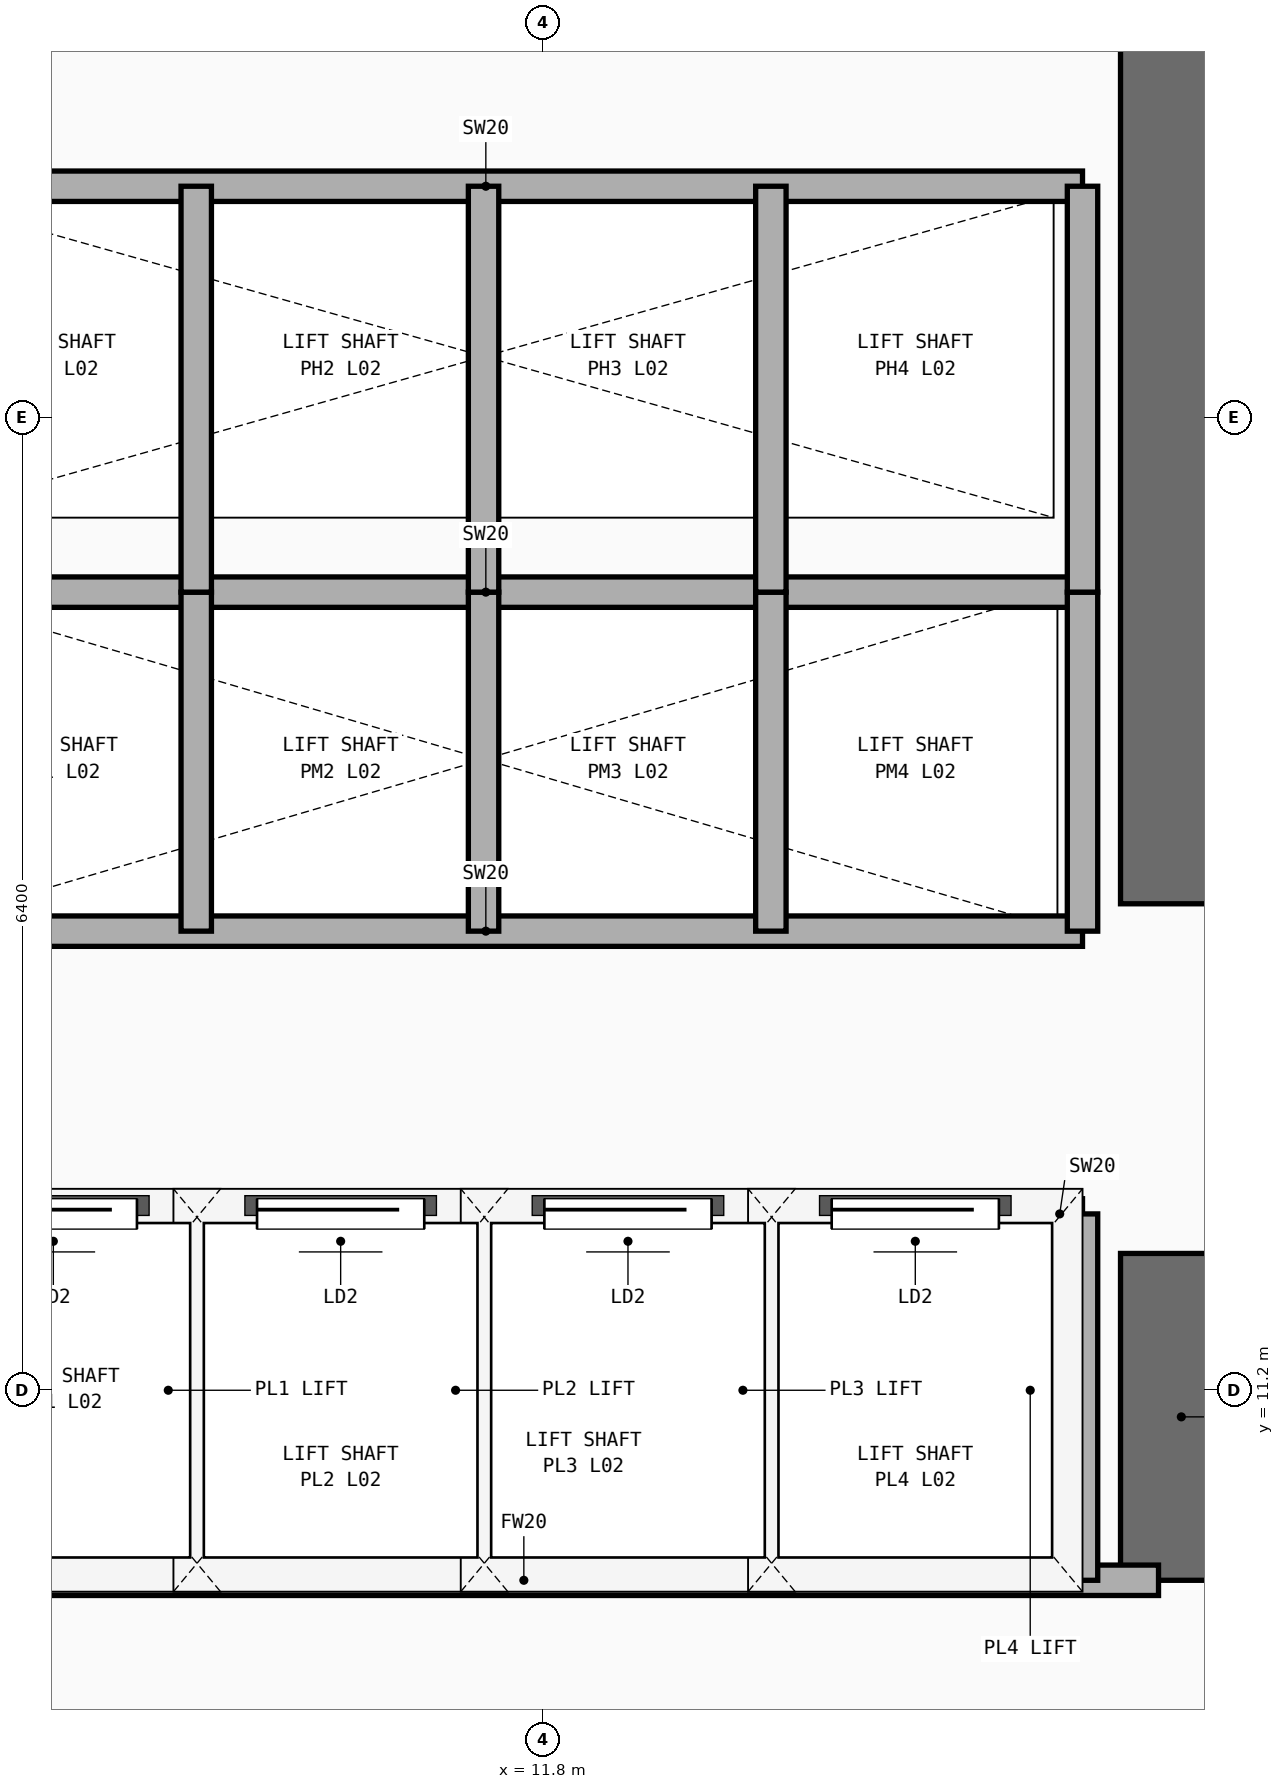
"""IFC4 building model, lengths in metres.
Left out: names, types, materials, properties, quantities, classifications, styles, units other than length and angle.
Written with IfcOpenShell. Run it as: python <this file> out.ifc"""

import sys

from ifc_helpers import new_model, si_unit, direction, frame, frame_2d, origin, place, context, subcontext, project, spatial, rectangle, extrude, element, fill, save


model = new_model("IFC4")
c1 = context("Model", 3, precision=1e-05, world=origin(), true_north=direction((0.0, 1.0)))
c2 = subcontext(c1, "Body", "Model", "MODEL_VIEW")
j1 = project(units=[si_unit("LENGTHUNIT", "METRE"), si_unit("PLANEANGLEUNIT", "RADIAN")], contexts=[c1])
p1 = place(None, origin())
s1 = spatial("IfcSite", under=j1, at=p1, CompositionType="ELEMENT")
p2 = place(p1, origin())
s2 = spatial("IfcBuilding", under=s1, at=p2, CompositionType="ELEMENT")
p3 = place(p2, frame((0.0, 0.0, 5.6)))
s3 = spatial("IfcBuildingStorey", under=s2, at=p3, CompositionType="ELEMENT", Elevation=5.6)
p4 = place(p3, frame((16.0, 9.95, 0.0), z_axis=(0.0, 0.0, 1.0), x_axis=(0.0, 1.0, 0.0)))
e1 = element("IfcWall", 1, at=p4, inside=s3, PredefinedType="SHEAR", context=c2, shape_type="SweptSolid", body=[
    extrude(rectangle(XDim=2.15, YDim=0.8, at=frame_2d((1.075, 0.0))), origin(), (0.0, 0.0, 1.0), 4.46),
])
p5 = place(p3, frame((16.0, 14.4, 0.0), z_axis=(0.0, 0.0, 1.0), x_axis=(0.0, 1.0, 0.0)))
e2 = element("IfcWall", 2, at=p5, inside=s3, PredefinedType="SHEAR", context=c2, shape_type="SweptSolid", body=[
    extrude(rectangle(XDim=9.1, YDim=0.8, at=frame_2d((4.55, 0.0))), origin(), (0.0, 0.0, 1.0), 4.46),
])
p6 = place(p3, frame((7.5, 9.95, 0.0), z_axis=(0.0, 0.0, 1.0), x_axis=(1.0, 0.0, 0.0)))
e3 = element("IfcWall", 3, at=p6, inside=s3, PredefinedType="PARTITIONING", context=c2, shape_type="SweptSolid", body=[
    extrude(rectangle(XDim=8.35, YDim=0.2, at=frame_2d((4.175, 0.0))), origin(), (0.0, 0.0, 1.0), 4.46),
])
p7 = place(p3, frame((7.5, 12.36, 0.0), z_axis=(0.0, 0.0, 1.0), x_axis=(1.0, 0.0, 0.0)))
e4 = element("IfcWall", 4, at=p7, inside=s3, PredefinedType="PARTITIONING", context=c2, shape_type="SweptSolid", body=[
    extrude(rectangle(XDim=7.85, YDim=0.2, at=frame_2d((3.925, 0.0))), origin(), (0.0, 0.0, 1.0), 4.46),
])
p8 = place(p7, frame((0.53, 0.0, 0.0)))
e5 = element("IfcOpeningElement", 5, at=p8, cuts=e4, PredefinedType="OPENING", context=c2, shape_type="SweptSolid", body=[
    extrude(rectangle(XDim=1.1, YDim=2.2, at=frame_2d((0.55, 1.1))), frame((0.0, 0.11, 0.0), z_axis=(0.0, -1.0, 0.0), x_axis=(1.0, 0.0, 0.0)), (0.0, 0.0, 1.0), 0.22),
])
p9 = place(p7, frame((2.42, 0.0, 0.0)))
e6 = element("IfcOpeningElement", 6, at=p9, cuts=e4, PredefinedType="OPENING", context=c2, shape_type="SweptSolid", body=[
    extrude(rectangle(XDim=1.1, YDim=2.2, at=frame_2d((0.55, 1.1))), frame((0.0, 0.11, 0.0), z_axis=(0.0, -1.0, 0.0), x_axis=(1.0, 0.0, 0.0)), (0.0, 0.0, 1.0), 0.22),
])
p10 = place(p7, frame((4.31, 0.0, 0.0)))
e7 = element("IfcOpeningElement", 7, at=p10, cuts=e4, PredefinedType="OPENING", context=c2, shape_type="SweptSolid", body=[
    extrude(rectangle(XDim=1.1, YDim=2.2, at=frame_2d((0.55, 1.1))), frame((0.0, 0.11, 0.0), z_axis=(0.0, -1.0, 0.0), x_axis=(1.0, 0.0, 0.0)), (0.0, 0.0, 1.0), 0.22),
])
p11 = place(p7, frame((6.2, 0.0, 0.0)))
e8 = element("IfcOpeningElement", 8, at=p11, cuts=e4, PredefinedType="OPENING", context=c2, shape_type="SweptSolid", body=[
    extrude(rectangle(XDim=1.1, YDim=2.2, at=frame_2d((0.55, 1.1))), frame((0.0, 0.11, 0.0), z_axis=(0.0, -1.0, 0.0), x_axis=(1.0, 0.0, 0.0)), (0.0, 0.0, 1.0), 0.22),
])
for number, where, z_axis, x_axis in (
    (9, (15.35, 9.95, 0.0), (0.0, 0.0, 1.0), (0.0, 1.0, 0.0)),
    (10, (9.52, 9.95, 0.0), (0.0, 0.0, 1.0), (0.0, 1.0, 0.0)),
    (11, (11.41, 9.95, 0.0), (0.0, 0.0, 1.0), (0.0, 1.0, 0.0)),
    (12, (13.3, 9.95, 0.0), (0.0, 0.0, 1.0), (0.0, 1.0, 0.0)),
):
    element("IfcWall", number, at=place(p3, frame(where, z_axis=z_axis, x_axis=x_axis)), inside=s3, PredefinedType="PARTITIONING", context=c2, shape_type="SweptSolid", body=[
        extrude(rectangle(XDim=2.41, YDim=0.2, at=frame_2d((1.205, 0.0))), origin(), (0.0, 0.0, 1.0), 4.46),
    ])
for number, where, z_axis, x_axis in (
    (13, (7.5, 14.22, 0.0), (0.0, 0.0, 1.0), (1.0, 0.0, 0.0)),
    (14, (7.5, 16.45, 0.0), (0.0, 0.0, 1.0), (1.0, 0.0, 0.0)),
):
    element("IfcWall", number, at=place(p3, frame(where, z_axis=z_axis, x_axis=x_axis)), inside=s3, PredefinedType="PARTITIONING", context=c2, shape_type="SweptSolid", body=[
        extrude(rectangle(XDim=7.85, YDim=0.2, at=frame_2d((3.925, 0.0))), origin(), (0.0, 0.0, 1.0), 4.46),
    ])
for number, where, z_axis, x_axis in (
    (15, (15.35, 14.22, 0.0), (0.0, 0.0, 1.0), (0.0, 1.0, 0.0)),
    (16, (9.52, 14.22, 0.0), (0.0, 0.0, 1.0), (0.0, 1.0, 0.0)),
    (17, (11.41, 14.22, 0.0), (0.0, 0.0, 1.0), (0.0, 1.0, 0.0)),
    (18, (13.3, 14.22, 0.0), (0.0, 0.0, 1.0), (0.0, 1.0, 0.0)),
):
    element("IfcWall", number, at=place(p3, frame(where, z_axis=z_axis, x_axis=x_axis)), inside=s3, PredefinedType="PARTITIONING", context=c2, shape_type="SweptSolid", body=[
        extrude(rectangle(XDim=2.23, YDim=0.2, at=frame_2d((1.115, 0.0))), origin(), (0.0, 0.0, 1.0), 4.46),
    ])
p12 = place(p3, frame((7.5, 19.12, 0.0), z_axis=(0.0, 0.0, 1.0), x_axis=(1.0, 0.0, 0.0)))
e19 = element("IfcWall", 19, at=p12, inside=s3, PredefinedType="PARTITIONING", context=c2, shape_type="SweptSolid", body=[
    extrude(rectangle(XDim=7.85, YDim=0.2, at=frame_2d((3.925, 0.0))), origin(), (0.0, 0.0, 1.0), 4.46),
])
for number, where, z_axis, x_axis in (
    (20, (15.35, 16.45, 0.0), (0.0, 0.0, 1.0), (0.0, 1.0, 0.0)),
    (21, (9.52, 16.45, 0.0), (0.0, 0.0, 1.0), (0.0, 1.0, 0.0)),
    (22, (11.41, 16.45, 0.0), (0.0, 0.0, 1.0), (0.0, 1.0, 0.0)),
    (23, (13.3, 16.45, 0.0), (0.0, 0.0, 1.0), (0.0, 1.0, 0.0)),
):
    element("IfcWall", number, at=place(p3, frame(where, z_axis=z_axis, x_axis=x_axis)), inside=s3, PredefinedType="PARTITIONING", context=c2, shape_type="SweptSolid", body=[
        extrude(rectangle(XDim=2.67, YDim=0.2, at=frame_2d((1.335, 0.0))), origin(), (0.0, 0.0, 1.0), 4.46),
    ])
p13 = place(p8, origin())
e24 = element("IfcDoor", 24, at=p13, inside=s3, OperationType="SLIDING_TO_LEFT", PredefinedType="DOOR", context=c2, shape_type="SweptSolid", body=[
    extrude(rectangle(XDim=1.1, YDim=2.2, at=frame_2d((0.55, 1.1))), frame((0.0, 0.025, 0.0), z_axis=(0.0, -1.0, 0.0), x_axis=(1.0, 0.0, 0.0)), (0.0, 0.0, 1.0), 0.05),
])
fill(e5, e24)
p14 = place(p9, origin())
e25 = element("IfcDoor", 25, at=p14, inside=s3, OperationType="SLIDING_TO_LEFT", PredefinedType="DOOR", context=c2, shape_type="SweptSolid", body=[
    extrude(rectangle(XDim=1.1, YDim=2.2, at=frame_2d((0.55, 1.1))), frame((0.0, 0.025, 0.0), z_axis=(0.0, -1.0, 0.0), x_axis=(1.0, 0.0, 0.0)), (0.0, 0.0, 1.0), 0.05),
])
fill(e6, e25)
p15 = place(p10, origin())
e26 = element("IfcDoor", 26, at=p15, inside=s3, OperationType="SLIDING_TO_LEFT", PredefinedType="DOOR", context=c2, shape_type="SweptSolid", body=[
    extrude(rectangle(XDim=1.1, YDim=2.2, at=frame_2d((0.55, 1.1))), frame((0.0, 0.025, 0.0), z_axis=(0.0, -1.0, 0.0), x_axis=(1.0, 0.0, 0.0)), (0.0, 0.0, 1.0), 0.05),
])
fill(e7, e26)
p16 = place(p11, origin())
e27 = element("IfcDoor", 27, at=p16, inside=s3, OperationType="SLIDING_TO_LEFT", PredefinedType="DOOR", context=c2, shape_type="SweptSolid", body=[
    extrude(rectangle(XDim=1.1, YDim=2.2, at=frame_2d((0.55, 1.1))), frame((0.0, 0.025, 0.0), z_axis=(0.0, -1.0, 0.0), x_axis=(1.0, 0.0, 0.0)), (0.0, 0.0, 1.0), 0.05),
])
fill(e8, e27)
save(model, sys.argv[1])
